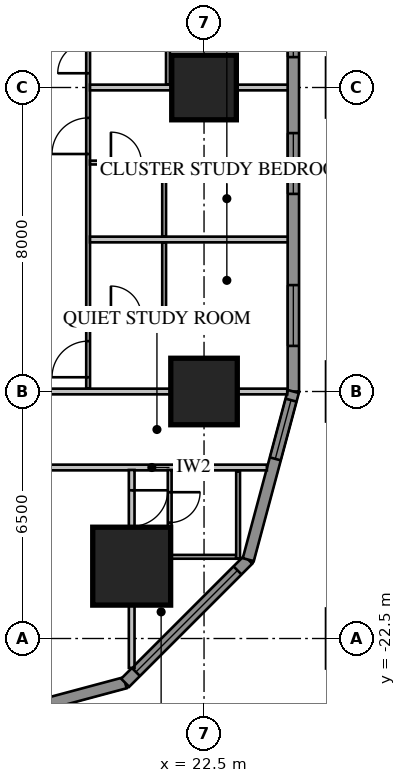
"""IFC4 building model, lengths in metres.
Left out: names, types, materials, properties, quantities, classifications, styles, units other than length and angle.
Written with IfcOpenShell. Run it as: python <this file> out.ifc"""

import sys

from ifc_helpers import new_model, si_unit, direction, frame, frame_2d, origin, origin_2d, place, context, subcontext, project, spatial, rectangle, extrude, element, fill, save


model = new_model("IFC4")
c1 = context("Model", 3, precision=1e-05, world=origin(), true_north=direction((0.0, 1.0)))
c2 = subcontext(c1, "Body", "Model", "MODEL_VIEW")
j1 = project(units=[si_unit("LENGTHUNIT", "METRE"), si_unit("PLANEANGLEUNIT", "RADIAN")], contexts=[c1])
p1 = place(None, origin())
s1 = spatial("IfcSite", under=j1, at=p1, CompositionType="ELEMENT")
p2 = place(p1, origin())
s2 = spatial("IfcBuilding", under=s1, at=p2, CompositionType="ELEMENT")
p3 = place(p2, frame((0.0, 0.0, 31.4)))
s3 = spatial("IfcBuildingStorey", under=s2, at=p3, CompositionType="ELEMENT", Elevation=31.4)
p4 = place(p3, frame((22.5, -16.0, 0.0), z_axis=(0.0, 0.0, 1.0), x_axis=(1.0, 0.0, 0.0)))
e1 = element("IfcColumn", 1, at=p4, inside=s3, PredefinedType="COLUMN", context=c2, shape_type="SweptSolid", body=[
    extrude(rectangle(XDim=1.75, YDim=1.75, at=origin_2d()), origin(), (0.0, 0.0, 1.0), 3.85),
])
p5 = place(p3, frame((22.5, -8.0, 0.0), z_axis=(0.0, 0.0, 1.0), x_axis=(1.0, 0.0, 0.0)))
e2 = element("IfcColumn", 2, at=p5, inside=s3, PredefinedType="COLUMN", context=c2, shape_type="SweptSolid", body=[
    extrude(rectangle(XDim=1.7, YDim=1.7, at=origin_2d()), origin(), (0.0, 0.0, 1.0), 3.85),
])
p6 = place(p3, frame((20.596, -20.596, 0.0), z_axis=(0.0, 0.0, 1.0), x_axis=(1.0, 0.0, 0.0)))
e3 = element("IfcColumn", 3, at=p6, inside=s3, PredefinedType="COLUMN", context=c2, shape_type="SweptSolid", body=[
    extrude(rectangle(XDim=2.05, YDim=2.05, at=origin_2d()), origin(), (0.0, 0.0, 1.0), 3.85),
])
p7 = place(p3, frame((24.85, -16.0, 0.0), z_axis=(0.0, 0.0, 1.0), x_axis=(0.0, 1.0, 0.0)))
e4 = element("IfcWall", 4, at=p7, inside=s3, PredefinedType="SOLIDWALL", context=c2, shape_type="SweptSolid", body=[
    extrude(rectangle(XDim=32.0, YDim=0.3, at=frame_2d((16.0, 0.0))), origin(), (0.0, 0.0, 1.0), 3.65),
])
p8 = place(p7, frame((1.2, 0.0, 0.75)))
e5 = element("IfcOpeningElement", 5, at=p8, cuts=e4, PredefinedType="OPENING", context=c2, shape_type="SweptSolid", body=[
    extrude(rectangle(XDim=1.6, YDim=1.8, at=frame_2d((0.8, 0.9))), frame((0.0, 0.17, 0.0), z_axis=(0.0, -1.0, 0.0), x_axis=(1.0, 0.0, 0.0)), (0.0, 0.0, 1.0), 0.34),
])
p9 = place(p7, frame((5.2, 0.0, 0.75)))
e6 = element("IfcOpeningElement", 6, at=p9, cuts=e4, PredefinedType="OPENING", context=c2, shape_type="SweptSolid", body=[
    extrude(rectangle(XDim=1.6, YDim=1.8, at=frame_2d((0.8, 0.9))), frame((0.0, 0.17, 0.0), z_axis=(0.0, -1.0, 0.0), x_axis=(1.0, 0.0, 0.0)), (0.0, 0.0, 1.0), 0.34),
])
p10 = place(p7, frame((17.2, 0.0, 0.75)))
e7 = element("IfcOpeningElement", 7, at=p10, cuts=e4, PredefinedType="OPENING", context=c2, shape_type="SweptSolid", body=[
    extrude(rectangle(XDim=1.6, YDim=1.8, at=frame_2d((0.8, 0.9))), frame((0.0, 0.17, 0.0), z_axis=(0.0, -1.0, 0.0), x_axis=(1.0, 0.0, 0.0)), (0.0, 0.0, 1.0), 0.34),
])
p11 = place(p7, frame((21.2, 0.0, 0.75)))
e8 = element("IfcOpeningElement", 8, at=p11, cuts=e4, PredefinedType="OPENING", context=c2, shape_type="SweptSolid", body=[
    extrude(rectangle(XDim=1.6, YDim=1.8, at=frame_2d((0.8, 0.9))), frame((0.0, 0.17, 0.0), z_axis=(0.0, -1.0, 0.0), x_axis=(1.0, 0.0, 0.0)), (0.0, 0.0, 1.0), 0.34),
])
p12 = place(p7, frame((25.2, 0.0, 0.75)))
e9 = element("IfcOpeningElement", 9, at=p12, cuts=e4, PredefinedType="OPENING", context=c2, shape_type="SweptSolid", body=[
    extrude(rectangle(XDim=1.6, YDim=1.8, at=frame_2d((0.8, 0.9))), frame((0.0, 0.17, 0.0), z_axis=(0.0, -1.0, 0.0), x_axis=(1.0, 0.0, 0.0)), (0.0, 0.0, 1.0), 0.34),
])
p13 = place(p7, frame((29.2, 0.0, 0.75)))
e10 = element("IfcOpeningElement", 10, at=p13, cuts=e4, PredefinedType="OPENING", context=c2, shape_type="SweptSolid", body=[
    extrude(rectangle(XDim=1.6, YDim=1.8, at=frame_2d((0.8, 0.9))), frame((0.0, 0.17, 0.0), z_axis=(0.0, -1.0, 0.0), x_axis=(1.0, 0.0, 0.0)), (0.0, 0.0, 1.0), 0.34),
])
p14 = place(p7, frame((8.8, 0.0, 0.75)))
e11 = element("IfcOpeningElement", 11, at=p14, cuts=e4, PredefinedType="OPENING", context=c2, shape_type="SweptSolid", body=[
    extrude(rectangle(XDim=2.4, YDim=1.8, at=frame_2d((1.2, 0.9))), frame((0.0, 0.17, 0.0), z_axis=(0.0, -1.0, 0.0), x_axis=(1.0, 0.0, 0.0)), (0.0, 0.0, 1.0), 0.34),
])
p15 = place(p7, frame((13.812, 0.0, 0.0)))
e12 = element("IfcOpeningElement", 12, at=p15, cuts=e4, PredefinedType="OPENING", context=c2, shape_type="SweptSolid", body=[
    extrude(rectangle(XDim=1.0, YDim=2.4, at=frame_2d((0.5, 1.2))), frame((0.0, 0.17, 0.0), z_axis=(0.0, -1.0, 0.0), x_axis=(1.0, 0.0, 0.0)), (0.0, 0.0, 1.0), 0.34),
])
p16 = place(p3, frame((16.0, -24.85, 0.0), z_axis=(0.0, 0.0, 1.0), x_axis=(0.965920218567, 0.258839972501, 0.0)))
e13 = element("IfcWall", 13, at=p16, inside=s3, PredefinedType="SOLIDWALL", context=c2, shape_type="SweptSolid", body=[
    extrude(rectangle(XDim=4.581, YDim=0.3, at=frame_2d((2.291, 0.0))), origin(), (0.0, 0.0, 1.0), 3.65),
])
p17 = place(p3, frame((20.425, -23.664, 0.0), z_axis=(0.0, 0.0, 1.0), x_axis=(0.707106781187, 0.707106781187, 0.0)))
e14 = element("IfcWall", 14, at=p17, inside=s3, PredefinedType="SOLIDWALL", context=c2, shape_type="SweptSolid", body=[
    extrude(rectangle(XDim=4.581, YDim=0.3, at=frame_2d((2.291, 0.0))), origin(), (0.0, 0.0, 1.0), 3.65),
])
p18 = place(p17, frame((0.4, 0.0, 0.75)))
e15 = element("IfcOpeningElement", 15, at=p18, cuts=e14, PredefinedType="OPENING", context=c2, shape_type="SweptSolid", body=[
    extrude(rectangle(XDim=3.781, YDim=1.8, at=frame_2d((1.891, 0.9))), frame((0.0, 0.17, 0.0), z_axis=(0.0, -1.0, 0.0), x_axis=(1.0, 0.0, 0.0)), (0.0, 0.0, 1.0), 0.34),
])
p19 = place(p3, frame((23.664, -20.425, 0.0), z_axis=(0.0, 0.0, 1.0), x_axis=(0.258839972501, 0.965920218567, 0.0)))
e16 = element("IfcWall", 16, at=p19, inside=s3, PredefinedType="SOLIDWALL", context=c2, shape_type="SweptSolid", body=[
    extrude(rectangle(XDim=4.581, YDim=0.3, at=frame_2d((2.291, 0.0))), origin(), (0.0, 0.0, 1.0), 3.65),
])
p20 = place(p19, frame((2.746, 0.0, 0.75)))
e17 = element("IfcOpeningElement", 17, at=p20, cuts=e16, PredefinedType="OPENING", context=c2, shape_type="SweptSolid", body=[
    extrude(rectangle(XDim=1.6, YDim=1.8, at=frame_2d((0.8, 0.9))), frame((0.0, 0.17, 0.0), z_axis=(0.0, -1.0, 0.0), x_axis=(1.0, 0.0, 0.0)), (0.0, 0.0, 1.0), 0.34),
])
p21 = place(p3, frame((19.45, -15.925, 0.0), z_axis=(0.0, 0.0, 1.0), x_axis=(0.0, 1.0, 0.0)))
e18 = element("IfcWall", 18, at=p21, inside=s3, PredefinedType="PARTITIONING", context=c2, shape_type="SweptSolid", body=[
    extrude(rectangle(XDim=31.85, YDim=0.1, at=frame_2d((15.925, 0.0))), origin(), (0.0, 0.0, 1.0), 3.65),
])
p22 = place(p21, frame((10.125, 0.0, 0.0)))
e19 = element("IfcOpeningElement", 19, at=p22, cuts=e18, PredefinedType="OPENING", context=c2, shape_type="SweptSolid", body=[
    extrude(rectangle(XDim=1.0, YDim=2.1, at=frame_2d((0.5, 1.05))), frame((0.0, 0.07, 0.0), z_axis=(0.0, -1.0, 0.0), x_axis=(1.0, 0.0, 0.0)), (0.0, 0.0, 1.0), 0.14),
])
p23 = place(p21, frame((8.3, 0.0, 0.0)))
e20 = element("IfcOpeningElement", 20, at=p23, cuts=e18, PredefinedType="OPENING", context=c2, shape_type="SweptSolid", body=[
    extrude(rectangle(XDim=0.8, YDim=2.1, at=frame_2d((0.4, 1.05))), frame((0.0, 0.07, 0.0), z_axis=(0.0, -1.0, 0.0), x_axis=(1.0, 0.0, 0.0)), (0.0, 0.0, 1.0), 0.14),
])
p24 = place(p21, frame((0.3, 0.0, 0.0)))
e21 = element("IfcOpeningElement", 21, at=p24, cuts=e18, PredefinedType="OPENING", context=c2, shape_type="SweptSolid", body=[
    extrude(rectangle(XDim=0.95, YDim=2.1, at=frame_2d((0.475, 1.05))), frame((0.0, 0.07, 0.0), z_axis=(0.0, -1.0, 0.0), x_axis=(1.0, 0.0, 0.0)), (0.0, 0.0, 1.0), 0.14),
])
p25 = place(p21, frame((6.175, 0.0, 0.0)))
e22 = element("IfcOpeningElement", 22, at=p25, cuts=e18, PredefinedType="OPENING", context=c2, shape_type="SweptSolid", body=[
    extrude(rectangle(XDim=0.95, YDim=2.1, at=frame_2d((0.475, 1.05))), frame((0.0, 0.07, 0.0), z_axis=(0.0, -1.0, 0.0), x_axis=(1.0, 0.0, 0.0)), (0.0, 0.0, 1.0), 0.14),
])
p26 = place(p21, frame((16.3, 0.0, 0.0)))
e23 = element("IfcOpeningElement", 23, at=p26, cuts=e18, PredefinedType="OPENING", context=c2, shape_type="SweptSolid", body=[
    extrude(rectangle(XDim=0.95, YDim=2.1, at=frame_2d((0.475, 1.05))), frame((0.0, 0.07, 0.0), z_axis=(0.0, -1.0, 0.0), x_axis=(1.0, 0.0, 0.0)), (0.0, 0.0, 1.0), 0.14),
])
p27 = place(p21, frame((22.175, 0.0, 0.0)))
e24 = element("IfcOpeningElement", 24, at=p27, cuts=e18, PredefinedType="OPENING", context=c2, shape_type="SweptSolid", body=[
    extrude(rectangle(XDim=0.95, YDim=2.1, at=frame_2d((0.475, 1.05))), frame((0.0, 0.07, 0.0), z_axis=(0.0, -1.0, 0.0), x_axis=(1.0, 0.0, 0.0)), (0.0, 0.0, 1.0), 0.14),
])
p28 = place(p21, frame((24.3, 0.0, 0.0)))
e25 = element("IfcOpeningElement", 25, at=p28, cuts=e18, PredefinedType="OPENING", context=c2, shape_type="SweptSolid", body=[
    extrude(rectangle(XDim=0.95, YDim=2.1, at=frame_2d((0.475, 1.05))), frame((0.0, 0.07, 0.0), z_axis=(0.0, -1.0, 0.0), x_axis=(1.0, 0.0, 0.0)), (0.0, 0.0, 1.0), 0.14),
])
p29 = place(p21, frame((30.175, 0.0, 0.0)))
e26 = element("IfcOpeningElement", 26, at=p29, cuts=e18, PredefinedType="OPENING", context=c2, shape_type="SweptSolid", body=[
    extrude(rectangle(XDim=0.95, YDim=2.1, at=frame_2d((0.475, 1.05))), frame((0.0, 0.07, 0.0), z_axis=(0.0, -1.0, 0.0), x_axis=(1.0, 0.0, 0.0)), (0.0, 0.0, 1.0), 0.14),
])
p30 = place(p3, frame((21.55, -7.925, 0.0), z_axis=(0.0, 0.0, 1.0), x_axis=(0.0, 1.0, 0.0)))
e27 = element("IfcWall", 27, at=p30, inside=s3, PredefinedType="PARTITIONING", context=c2, shape_type="SweptSolid", body=[
    extrude(rectangle(XDim=1.7, YDim=0.1, at=frame_2d((0.85, 0.0))), origin(), (0.0, 0.0, 1.0), 3.65),
])
p31 = place(p3, frame((18.1, -18.0, 0.0), z_axis=(0.0, 0.0, 1.0), x_axis=(1.0, 0.0, 0.0)))
e28 = element("IfcWall", 28, at=p31, inside=s3, PredefinedType="PARTITIONING", context=c2, shape_type="SweptSolid", body=[
    extrude(rectangle(XDim=6.053, YDim=0.15, at=frame_2d((3.027, 0.0))), origin(), (0.0, 0.0, 1.0), 3.65),
])
p32 = place(p3, frame((18.1, -16.0, 0.0), z_axis=(0.0, 0.0, 1.0), x_axis=(1.0, 0.0, 0.0)))
e29 = element("IfcWall", 29, at=p32, inside=s3, PredefinedType="PARTITIONING", context=c2, shape_type="SweptSolid", body=[
    extrude(rectangle(XDim=6.589, YDim=0.15, at=frame_2d((3.295, 0.0))), origin(), (0.0, 0.0, 1.0), 3.65),
])
for number, where, z_axis, x_axis in (
    (30, (19.5, -12.0, 0.0), (0.0, 0.0, 1.0), (1.0, 0.0, 0.0)),
    (31, (19.5, -8.0, 0.0), (0.0, 0.0, 1.0), (1.0, 0.0, 0.0)),
):
    element("IfcWall", number, at=place(p3, frame(where, z_axis=z_axis, x_axis=x_axis)), inside=s3, PredefinedType="PARTITIONING", context=c2, shape_type="SweptSolid", body=[
        extrude(rectangle(XDim=5.2, YDim=0.15, at=frame_2d((2.6, 0.0))), origin(), (0.0, 0.0, 1.0), 3.65),
    ])
p33 = place(p3, frame((19.5, -14.025, 0.0), z_axis=(0.0, 0.0, 1.0), x_axis=(1.0, 0.0, 0.0)))
e32 = element("IfcWall", 32, at=p33, inside=s3, PredefinedType="PARTITIONING", context=c2, shape_type="SweptSolid", body=[
    extrude(rectangle(XDim=2.0, YDim=0.1, at=frame_2d((1.0, 0.0))), origin(), (0.0, 0.0, 1.0), 3.65),
])
p34 = place(p33, frame((0.55, 0.0, 0.0)))
e33 = element("IfcOpeningElement", 33, at=p34, cuts=e32, PredefinedType="OPENING", context=c2, shape_type="SweptSolid", body=[
    extrude(rectangle(XDim=0.8, YDim=2.1, at=frame_2d((0.4, 1.05))), frame((0.0, 0.07, 0.0), z_axis=(0.0, -1.0, 0.0), x_axis=(1.0, 0.0, 0.0)), (0.0, 0.0, 1.0), 0.14),
])
p35 = place(p3, frame((21.45, -13.975, 0.0), z_axis=(0.0, 0.0, 1.0), x_axis=(0.0, 1.0, 0.0)))
e34 = element("IfcWall", 34, at=p35, inside=s3, PredefinedType="PARTITIONING", context=c2, shape_type="SweptSolid", body=[
    extrude(rectangle(XDim=1.9, YDim=0.1, at=frame_2d((0.95, 0.0))), origin(), (0.0, 0.0, 1.0), 3.65),
])
p36 = place(p3, frame((19.5, -9.975, 0.0), z_axis=(0.0, 0.0, 1.0), x_axis=(1.0, 0.0, 0.0)))
e35 = element("IfcWall", 35, at=p36, inside=s3, PredefinedType="PARTITIONING", context=c2, shape_type="SweptSolid", body=[
    extrude(rectangle(XDim=2.0, YDim=0.1, at=frame_2d((1.0, 0.0))), origin(), (0.0, 0.0, 1.0), 3.65),
])
p37 = place(p36, frame((0.55, 0.0, 0.0)))
e36 = element("IfcOpeningElement", 36, at=p37, cuts=e35, PredefinedType="OPENING", context=c2, shape_type="SweptSolid", body=[
    extrude(rectangle(XDim=0.8, YDim=2.1, at=frame_2d((0.4, 1.05))), frame((0.0, 0.07, 0.0), z_axis=(0.0, -1.0, 0.0), x_axis=(1.0, 0.0, 0.0)), (0.0, 0.0, 1.0), 0.14),
])
p38 = place(p3, frame((21.45, -11.925, 0.0), z_axis=(0.0, 0.0, 1.0), x_axis=(0.0, 1.0, 0.0)))
e37 = element("IfcWall", 37, at=p38, inside=s3, PredefinedType="PARTITIONING", context=c2, shape_type="SweptSolid", body=[
    extrude(rectangle(XDim=1.9, YDim=0.1, at=frame_2d((0.95, 0.0))), origin(), (0.0, 0.0, 1.0), 3.65),
])
p39 = place(p3, frame((21.596, -18.065, 0.0), z_axis=(0.0, 0.0, 1.0), x_axis=(0.0, -1.0, 0.0)))
e38 = element("IfcWall", 38, at=p39, inside=s3, PredefinedType="PARTITIONING", context=c2, shape_type="SweptSolid", body=[
    extrude(rectangle(XDim=2.335, YDim=0.1, at=frame_2d((1.167, 0.0))), origin(), (0.0, 0.0, 1.0), 3.65),
])
p40 = place(p39, frame((0.585, 0.0, 0.0)))
e39 = element("IfcOpeningElement", 39, at=p40, cuts=e38, PredefinedType="OPENING", context=c2, shape_type="SweptSolid", body=[
    extrude(rectangle(XDim=0.8, YDim=2.1, at=frame_2d((0.4, 1.05))), frame((0.0, 0.07, 0.0), z_axis=(0.0, -1.0, 0.0), x_axis=(1.0, 0.0, 0.0)), (0.0, 0.0, 1.0), 0.14),
])
p41 = place(p3, frame((21.646, -20.35, 0.0), z_axis=(0.0, 0.0, 1.0), x_axis=(1.0, 0.0, 0.0)))
e40 = element("IfcWall", 40, at=p41, inside=s3, PredefinedType="PARTITIONING", context=c2, shape_type="SweptSolid", body=[
    extrude(rectangle(XDim=1.7, YDim=0.1, at=frame_2d((0.85, 0.0))), origin(), (0.0, 0.0, 1.0), 3.65),
])
p42 = place(p3, frame((23.396, -18.1, 0.0), z_axis=(0.0, 0.0, 1.0), x_axis=(0.0, -1.0, 0.0)))
e41 = element("IfcWall", 41, at=p42, inside=s3, PredefinedType="PARTITIONING", context=c2, shape_type="SweptSolid", body=[
    extrude(rectangle(XDim=2.3, YDim=0.1, at=frame_2d((1.15, 0.0))), origin(), (0.0, 0.0, 1.0), 3.65),
])
p43 = place(p3, frame((20.596, -18.065, 0.0), z_axis=(0.0, 0.0, 1.0), x_axis=(0.0, -1.0, 0.0)))
e42 = element("IfcWall", 42, at=p43, inside=s3, PredefinedType="PARTITIONING", context=c2, shape_type="SweptSolid", body=[
    extrude(rectangle(XDim=5.209, YDim=0.15, at=frame_2d((2.604, 0.0))), origin(), (0.0, 0.0, 1.0), 3.65),
])
p44 = place(p43, frame((0.535, 0.0, 0.0)))
e43 = element("IfcOpeningElement", 43, at=p44, cuts=e42, PredefinedType="OPENING", context=c2, shape_type="SweptSolid", body=[
    extrude(rectangle(XDim=0.95, YDim=2.1, at=frame_2d((0.475, 1.05))), frame((0.0, 0.095, 0.0), z_axis=(0.0, -1.0, 0.0), x_axis=(1.0, 0.0, 0.0)), (0.0, 0.0, 1.0), 0.19),
])
p45 = place(p20, origin())
e44 = element("IfcWindow", 44, at=p45, inside=s3, PartitioningType="SINGLE_PANEL", PredefinedType="WINDOW", context=c2, shape_type="SweptSolid", body=[
    extrude(rectangle(XDim=1.6, YDim=1.8, at=frame_2d((0.8, 0.9))), frame((0.0, 0.03, 0.0), z_axis=(0.0, -1.0, 0.0), x_axis=(1.0, 0.0, 0.0)), (0.0, 0.0, 1.0), 0.06),
])
fill(e17, e44)
p46 = place(p8, origin())
e45 = element("IfcWindow", 45, at=p46, inside=s3, PartitioningType="SINGLE_PANEL", PredefinedType="WINDOW", context=c2, shape_type="SweptSolid", body=[
    extrude(rectangle(XDim=1.6, YDim=1.8, at=frame_2d((0.8, 0.9))), frame((0.0, 0.03, 0.0), z_axis=(0.0, -1.0, 0.0), x_axis=(1.0, 0.0, 0.0)), (0.0, 0.0, 1.0), 0.06),
])
fill(e5, e45)
p47 = place(p9, origin())
e46 = element("IfcWindow", 46, at=p47, inside=s3, PartitioningType="SINGLE_PANEL", PredefinedType="WINDOW", context=c2, shape_type="SweptSolid", body=[
    extrude(rectangle(XDim=1.6, YDim=1.8, at=frame_2d((0.8, 0.9))), frame((0.0, 0.03, 0.0), z_axis=(0.0, -1.0, 0.0), x_axis=(1.0, 0.0, 0.0)), (0.0, 0.0, 1.0), 0.06),
])
fill(e6, e46)
p48 = place(p14, origin())
e47 = element("IfcWindow", 47, at=p48, inside=s3, PartitioningType="SINGLE_PANEL", PredefinedType="WINDOW", context=c2, shape_type="SweptSolid", body=[
    extrude(rectangle(XDim=2.4, YDim=1.8, at=frame_2d((1.2, 0.9))), frame((0.0, 0.03, 0.0), z_axis=(0.0, -1.0, 0.0), x_axis=(1.0, 0.0, 0.0)), (0.0, 0.0, 1.0), 0.06),
])
fill(e11, e47)
p49 = place(p18, origin())
e48 = element("IfcWindow", 48, at=p49, inside=s3, PartitioningType="SINGLE_PANEL", PredefinedType="WINDOW", context=c2, shape_type="SweptSolid", body=[
    extrude(rectangle(XDim=3.781, YDim=1.8, at=frame_2d((1.891, 0.9))), frame((0.0, 0.03, 0.0), z_axis=(0.0, -1.0, 0.0), x_axis=(1.0, 0.0, 0.0)), (0.0, 0.0, 1.0), 0.06),
])
fill(e15, e48)
p50 = place(p23, origin())
e49 = element("IfcDoor", 49, at=p50, inside=s3, OperationType="SINGLE_SWING_LEFT", PredefinedType="DOOR", context=c2, shape_type="SweptSolid", body=[
    extrude(rectangle(XDim=0.8, YDim=2.1, at=frame_2d((0.4, 1.05))), frame((0.0, 0.025, 0.0), z_axis=(0.0, -1.0, 0.0), x_axis=(1.0, 0.0, 0.0)), (0.0, 0.0, 1.0), 0.05),
])
fill(e20, e49)
p51 = place(p24, origin())
e50 = element("IfcDoor", 50, at=p51, inside=s3, OperationType="SINGLE_SWING_LEFT", PredefinedType="DOOR", context=c2, shape_type="SweptSolid", body=[
    extrude(rectangle(XDim=0.95, YDim=2.1, at=frame_2d((0.475, 1.05))), frame((0.0, 0.025, 0.0), z_axis=(0.0, -1.0, 0.0), x_axis=(1.0, 0.0, 0.0)), (0.0, 0.0, 1.0), 0.05),
])
fill(e21, e50)
p52 = place(p34, origin())
e51 = element("IfcDoor", 51, at=p52, inside=s3, OperationType="SINGLE_SWING_LEFT", PredefinedType="DOOR", context=c2, shape_type="SweptSolid", body=[
    extrude(rectangle(XDim=0.8, YDim=2.1, at=frame_2d((0.4, 1.05))), frame((0.0, 0.025, 0.0), z_axis=(0.0, -1.0, 0.0), x_axis=(1.0, 0.0, 0.0)), (0.0, 0.0, 1.0), 0.05),
])
fill(e33, e51)
p53 = place(p25, origin())
e52 = element("IfcDoor", 52, at=p53, inside=s3, OperationType="SINGLE_SWING_LEFT", PredefinedType="DOOR", context=c2, shape_type="SweptSolid", body=[
    extrude(rectangle(XDim=0.95, YDim=2.1, at=frame_2d((0.475, 1.05))), frame((0.0, 0.025, 0.0), z_axis=(0.0, -1.0, 0.0), x_axis=(1.0, 0.0, 0.0)), (0.0, 0.0, 1.0), 0.05),
])
fill(e22, e52)
p54 = place(p37, origin())
e53 = element("IfcDoor", 53, at=p54, inside=s3, OperationType="SINGLE_SWING_LEFT", PredefinedType="DOOR", context=c2, shape_type="SweptSolid", body=[
    extrude(rectangle(XDim=0.8, YDim=2.1, at=frame_2d((0.4, 1.05))), frame((0.0, 0.025, 0.0), z_axis=(0.0, -1.0, 0.0), x_axis=(1.0, 0.0, 0.0)), (0.0, 0.0, 1.0), 0.05),
])
fill(e36, e53)
p55 = place(p40, origin())
e54 = element("IfcDoor", 54, at=p55, inside=s3, OperationType="SINGLE_SWING_LEFT", PredefinedType="DOOR", context=c2, shape_type="SweptSolid", body=[
    extrude(rectangle(XDim=0.8, YDim=2.1, at=frame_2d((0.4, 1.05))), frame((0.0, 0.025, 0.0), z_axis=(0.0, -1.0, 0.0), x_axis=(1.0, 0.0, 0.0)), (0.0, 0.0, 1.0), 0.05),
])
fill(e39, e54)
p56 = place(p44, origin())
e55 = element("IfcDoor", 55, at=p56, inside=s3, OperationType="SINGLE_SWING_LEFT", PredefinedType="DOOR", context=c2, shape_type="SweptSolid", body=[
    extrude(rectangle(XDim=0.95, YDim=2.1, at=frame_2d((0.475, 1.05))), frame((0.0, 0.025, 0.0), z_axis=(0.0, -1.0, 0.0), x_axis=(1.0, 0.0, 0.0)), (0.0, 0.0, 1.0), 0.05),
])
fill(e43, e55)
save(model, sys.argv[1])
